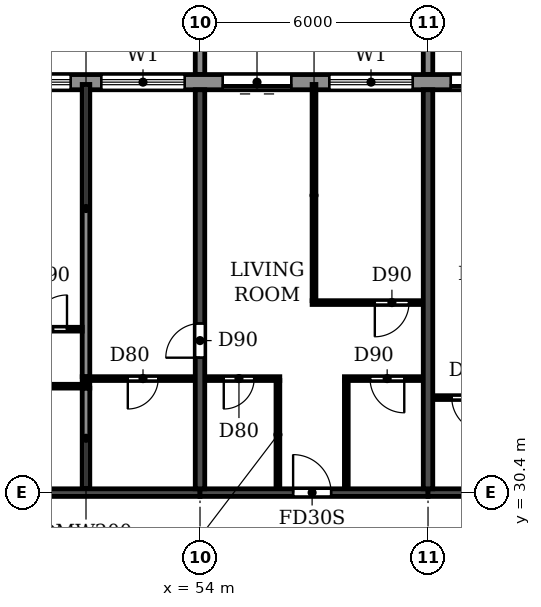
"""IFC4 building model, lengths in metres.
Left out: names, types, materials, properties, quantities, classifications, styles, units other than length and angle.
Written with IfcOpenShell. Run it as: python <this file> out.ifc"""

import sys

from ifc_helpers import new_model, si_unit, direction, frame, frame_2d, origin, place, context, subcontext, project, spatial, polyline, rectangle, outline, extrude, source, transform, mapped, element, fill, save


model = new_model("IFC4")
c1 = context("Model", 3, precision=1e-05, world=origin(), true_north=direction((0.0, 1.0)))
c2 = subcontext(c1, "Body", "Model", "MODEL_VIEW")
j1 = project(units=[si_unit("LENGTHUNIT", "METRE"), si_unit("PLANEANGLEUNIT", "RADIAN")], contexts=[c1])
p1 = place(None, origin())
s1 = spatial("IfcSite", under=j1, at=p1, CompositionType="ELEMENT")
p2 = place(p1, origin())
s2 = spatial("IfcBuilding", under=s1, at=p2, CompositionType="ELEMENT")
p3 = place(p2, frame((0.0, 0.0, 181.8)))
s3 = spatial("IfcBuildingStorey", under=s2, at=p3, CompositionType="ELEMENT", Elevation=181.8)
p4 = place(p3, frame((54.0, 30.5, 0.0), z_axis=(0.0, 0.0, 1.0), x_axis=(0.0, 1.0, 0.0)))
e1 = element("IfcWall", 1, at=p4, inside=s3, PredefinedType="SHEAR", context=c2, shape_type="SweptSolid", body=[
    extrude(rectangle(XDim=10.5, YDim=0.25, at=frame_2d((5.25, 0.0))), origin(), (0.0, 0.0, 1.0), 3.08),
])
p5 = place(p4, frame((3.45, 0.0, 0.0)))
e2 = element("IfcOpeningElement", 2, at=p5, cuts=e1, PredefinedType="OPENING", context=c2, shape_type="SweptSolid", body=[
    extrude(rectangle(XDim=0.9, YDim=2.1, at=frame_2d((0.45, 1.05))), frame((0.0, 0.135, 0.0), z_axis=(0.0, -1.0, 0.0), x_axis=(1.0, 0.0, 0.0)), (0.0, 0.0, 1.0), 0.27),
])
p6 = place(p3, frame((60.0, 30.5, 0.0), z_axis=(0.0, 0.0, 1.0), x_axis=(0.0, 1.0, 0.0)))
e3 = element("IfcWall", 3, at=p6, inside=s3, PredefinedType="SHEAR", context=c2, shape_type="SweptSolid", body=[
    extrude(rectangle(XDim=10.5, YDim=0.25, at=frame_2d((5.25, 0.0))), origin(), (0.0, 0.0, 1.0), 3.08),
])
p7 = place(p3, frame((48.0, 30.4, 0.0), z_axis=(0.0, 0.0, 1.0), x_axis=(1.0, 0.0, 0.0)))
e4 = element("IfcWall", 4, at=p7, inside=s3, PredefinedType="SHEAR", context=c2, shape_type="SweptSolid", body=[
    extrude(rectangle(XDim=6.0, YDim=0.2, at=frame_2d((3.0, 0.0))), origin(), (0.0, 0.0, 1.0), 2.48),
])
p8 = place(p3, frame((54.0, 30.4, 0.0), z_axis=(0.0, 0.0, 1.0), x_axis=(1.0, 0.0, 0.0)))
e5 = element("IfcWall", 5, at=p8, inside=s3, PredefinedType="SHEAR", context=c2, shape_type="SweptSolid", body=[
    extrude(rectangle(XDim=6.0, YDim=0.2, at=frame_2d((3.0, 0.0))), origin(), (0.0, 0.0, 1.0), 2.48),
])
p9 = place(p8, frame((2.45, 0.0, 0.0)))
e6 = element("IfcOpeningElement", 6, at=p9, cuts=e5, PredefinedType="OPENING", context=c2, shape_type="SweptSolid", body=[
    extrude(rectangle(XDim=1.0, YDim=2.1, at=frame_2d((0.5, 1.05))), frame((0.0, 0.11, 0.0), z_axis=(0.0, -1.0, 0.0), x_axis=(1.0, 0.0, 0.0)), (0.0, 0.0, 1.0), 0.22),
])
p10 = place(p3, frame((60.0, 30.4, 0.0), z_axis=(0.0, 0.0, 1.0), x_axis=(1.0, 0.0, 0.0)))
e7 = element("IfcWall", 7, at=p10, inside=s3, PredefinedType="SHEAR", context=c2, shape_type="SweptSolid", body=[
    extrude(rectangle(XDim=6.0, YDim=0.2, at=frame_2d((3.0, 0.0))), origin(), (0.0, 0.0, 1.0), 2.48),
])
p11 = place(p10, frame((2.55, 0.0, 0.0)))
e8 = element("IfcOpeningElement", 8, at=p11, cuts=e7, PredefinedType="OPENING", context=c2, shape_type="SweptSolid", body=[
    extrude(rectangle(XDim=1.0, YDim=2.1, at=frame_2d((0.5, 1.05))), frame((0.0, 0.11, 0.0), z_axis=(0.0, -1.0, 0.0), x_axis=(1.0, 0.0, 0.0)), (0.0, 0.0, 1.0), 0.22),
])
p12 = place(p3, frame((79.317, 41.2, 0.0), z_axis=(0.0, 0.0, 1.0), x_axis=(-1.0, 0.0, 0.0)))
e9 = element("IfcWall", 9, at=p12, inside=s3, PredefinedType="STANDARD", context=c2, shape_type="SweptSolid", body=[
    extrude(rectangle(XDim=56.634, YDim=0.4, at=frame_2d((28.317, 0.0))), origin(), (0.0, 0.0, 1.0), 3.08),
])
p13 = place(p12, frame((52.917, 0.0, 0.0)))
e10 = element("IfcOpeningElement", 10, at=p13, cuts=e9, PredefinedType="OPENING", context=c2, shape_type="SweptSolid", body=[
    extrude(rectangle(XDim=1.8, YDim=2.4, at=frame_2d((0.9, 1.2))), frame((0.0, 0.21, 0.0), z_axis=(0.0, -1.0, 0.0), x_axis=(1.0, 0.0, 0.0)), (0.0, 0.0, 1.0), 0.42),
])
p14 = place(p12, frame((49.717, 0.0, 0.9)))
e11 = element("IfcOpeningElement", 11, at=p14, cuts=e9, PredefinedType="OPENING", context=c2, shape_type="SweptSolid", body=[
    extrude(rectangle(XDim=2.2, YDim=1.5, at=frame_2d((1.1, 0.75))), frame((0.0, 0.21, 0.0), z_axis=(0.0, -1.0, 0.0), x_axis=(1.0, 0.0, 0.0)), (0.0, 0.0, 1.0), 0.42),
])
p15 = place(p12, frame((46.717, 0.0, 0.9)))
e12 = element("IfcOpeningElement", 12, at=p15, cuts=e9, PredefinedType="OPENING", context=c2, shape_type="SweptSolid", body=[
    extrude(rectangle(XDim=2.2, YDim=1.5, at=frame_2d((1.1, 0.75))), frame((0.0, 0.21, 0.0), z_axis=(0.0, -1.0, 0.0), x_axis=(1.0, 0.0, 0.0)), (0.0, 0.0, 1.0), 0.42),
])
p16 = place(p12, frame((43.917, 0.0, 0.0)))
e13 = element("IfcOpeningElement", 13, at=p16, cuts=e9, PredefinedType="OPENING", context=c2, shape_type="SweptSolid", body=[
    extrude(rectangle(XDim=1.8, YDim=2.4, at=frame_2d((0.9, 1.2))), frame((0.0, 0.21, 0.0), z_axis=(0.0, -1.0, 0.0), x_axis=(1.0, 0.0, 0.0)), (0.0, 0.0, 1.0), 0.42),
])
p17 = place(p12, frame((40.717, 0.0, 0.9)))
e14 = element("IfcOpeningElement", 14, at=p17, cuts=e9, PredefinedType="OPENING", context=c2, shape_type="SweptSolid", body=[
    extrude(rectangle(XDim=2.2, YDim=1.5, at=frame_2d((1.1, 0.75))), frame((0.0, 0.21, 0.0), z_axis=(0.0, -1.0, 0.0), x_axis=(1.0, 0.0, 0.0)), (0.0, 0.0, 1.0), 0.42),
])
p18 = place(p12, frame((37.717, 0.0, 0.9)))
e15 = element("IfcOpeningElement", 15, at=p18, cuts=e9, PredefinedType="OPENING", context=c2, shape_type="SweptSolid", body=[
    extrude(rectangle(XDim=2.2, YDim=1.5, at=frame_2d((1.1, 0.75))), frame((0.0, 0.21, 0.0), z_axis=(0.0, -1.0, 0.0), x_axis=(1.0, 0.0, 0.0)), (0.0, 0.0, 1.0), 0.42),
])
p19 = place(p12, frame((34.917, 0.0, 0.0)))
e16 = element("IfcOpeningElement", 16, at=p19, cuts=e9, PredefinedType="OPENING", context=c2, shape_type="SweptSolid", body=[
    extrude(rectangle(XDim=1.8, YDim=2.4, at=frame_2d((0.9, 1.2))), frame((0.0, 0.21, 0.0), z_axis=(0.0, -1.0, 0.0), x_axis=(1.0, 0.0, 0.0)), (0.0, 0.0, 1.0), 0.42),
])
p20 = place(p12, frame((31.717, 0.0, 0.9)))
e17 = element("IfcOpeningElement", 17, at=p20, cuts=e9, PredefinedType="OPENING", context=c2, shape_type="SweptSolid", body=[
    extrude(rectangle(XDim=2.2, YDim=1.5, at=frame_2d((1.1, 0.75))), frame((0.0, 0.21, 0.0), z_axis=(0.0, -1.0, 0.0), x_axis=(1.0, 0.0, 0.0)), (0.0, 0.0, 1.0), 0.42),
])
p21 = place(p12, frame((28.717, 0.0, 0.9)))
e18 = element("IfcOpeningElement", 18, at=p21, cuts=e9, PredefinedType="OPENING", context=c2, shape_type="SweptSolid", body=[
    extrude(rectangle(XDim=2.2, YDim=1.5, at=frame_2d((1.1, 0.75))), frame((0.0, 0.21, 0.0), z_axis=(0.0, -1.0, 0.0), x_axis=(1.0, 0.0, 0.0)), (0.0, 0.0, 1.0), 0.42),
])
p22 = place(p12, frame((25.717, 0.0, 0.9)))
e19 = element("IfcOpeningElement", 19, at=p22, cuts=e9, PredefinedType="OPENING", context=c2, shape_type="SweptSolid", body=[
    extrude(rectangle(XDim=2.2, YDim=1.5, at=frame_2d((1.1, 0.75))), frame((0.0, 0.21, 0.0), z_axis=(0.0, -1.0, 0.0), x_axis=(1.0, 0.0, 0.0)), (0.0, 0.0, 1.0), 0.42),
])
p23 = place(p12, frame((22.917, 0.0, 0.0)))
e20 = element("IfcOpeningElement", 20, at=p23, cuts=e9, PredefinedType="OPENING", context=c2, shape_type="SweptSolid", body=[
    extrude(rectangle(XDim=1.8, YDim=2.4, at=frame_2d((0.9, 1.2))), frame((0.0, 0.21, 0.0), z_axis=(0.0, -1.0, 0.0), x_axis=(1.0, 0.0, 0.0)), (0.0, 0.0, 1.0), 0.42),
])
p24 = place(p12, frame((19.717, 0.0, 0.9)))
e21 = element("IfcOpeningElement", 21, at=p24, cuts=e9, PredefinedType="OPENING", context=c2, shape_type="SweptSolid", body=[
    extrude(rectangle(XDim=2.2, YDim=1.5, at=frame_2d((1.1, 0.75))), frame((0.0, 0.21, 0.0), z_axis=(0.0, -1.0, 0.0), x_axis=(1.0, 0.0, 0.0)), (0.0, 0.0, 1.0), 0.42),
])
p25 = place(p12, frame((16.917, 0.0, 0.0)))
e22 = element("IfcOpeningElement", 22, at=p25, cuts=e9, PredefinedType="OPENING", context=c2, shape_type="SweptSolid", body=[
    extrude(rectangle(XDim=1.8, YDim=2.4, at=frame_2d((0.9, 1.2))), frame((0.0, 0.21, 0.0), z_axis=(0.0, -1.0, 0.0), x_axis=(1.0, 0.0, 0.0)), (0.0, 0.0, 1.0), 0.42),
])
p26 = place(p12, frame((13.717, 0.0, 0.9)))
e23 = element("IfcOpeningElement", 23, at=p26, cuts=e9, PredefinedType="OPENING", context=c2, shape_type="SweptSolid", body=[
    extrude(rectangle(XDim=2.2, YDim=1.5, at=frame_2d((1.1, 0.75))), frame((0.0, 0.21, 0.0), z_axis=(0.0, -1.0, 0.0), x_axis=(1.0, 0.0, 0.0)), (0.0, 0.0, 1.0), 0.42),
])
p27 = place(p12, frame((10.917, 0.0, 0.0)))
e24 = element("IfcOpeningElement", 24, at=p27, cuts=e9, PredefinedType="OPENING", context=c2, shape_type="SweptSolid", body=[
    extrude(rectangle(XDim=1.8, YDim=2.4, at=frame_2d((0.9, 1.2))), frame((0.0, 0.21, 0.0), z_axis=(0.0, -1.0, 0.0), x_axis=(1.0, 0.0, 0.0)), (0.0, 0.0, 1.0), 0.42),
])
p28 = place(p12, frame((7.717, 0.0, 0.9)))
e25 = element("IfcOpeningElement", 25, at=p28, cuts=e9, PredefinedType="OPENING", context=c2, shape_type="SweptSolid", body=[
    extrude(rectangle(XDim=2.2, YDim=1.5, at=frame_2d((1.1, 0.75))), frame((0.0, 0.21, 0.0), z_axis=(0.0, -1.0, 0.0), x_axis=(1.0, 0.0, 0.0)), (0.0, 0.0, 1.0), 0.42),
])
p29 = place(p12, frame((4.717, 0.0, 0.9)))
e26 = element("IfcOpeningElement", 26, at=p29, cuts=e9, PredefinedType="OPENING", context=c2, shape_type="SweptSolid", body=[
    extrude(rectangle(XDim=2.2, YDim=1.5, at=frame_2d((1.1, 0.75))), frame((0.0, 0.21, 0.0), z_axis=(0.0, -1.0, 0.0), x_axis=(1.0, 0.0, 0.0)), (0.0, 0.0, 1.0), 0.42),
])
p30 = place(p12, frame((1.917, 0.0, 0.0)))
e27 = element("IfcOpeningElement", 27, at=p30, cuts=e9, PredefinedType="OPENING", context=c2, shape_type="SweptSolid", body=[
    extrude(rectangle(XDim=1.8, YDim=2.4, at=frame_2d((0.9, 1.2))), frame((0.0, 0.21, 0.0), z_axis=(0.0, -1.0, 0.0), x_axis=(1.0, 0.0, 0.0)), (0.0, 0.0, 1.0), 0.42),
])
m1 = source(origin(), c2, "Body", "SweptSolid", [
    extrude(outline(polyline([(0.0, 0.0), (0.25, 0.0), (0.25, 3.1), (0.0, 3.1), (0.0, 0.0)])), origin(), (0.0, 0.0, 1.0), 3.1),
])
for number, where in (
    (28, (53.875, 41.4, 0.0)),
    (29, (59.875, 41.4, 0.0)),
):
    element("IfcWall", number, at=place(p3, frame(where)), inside=s3, PredefinedType="STANDARD", context=c2, shape_type="MappedRepresentation", body=[
        mapped(m1, transform((0.0, 0.0, 0.0))),
    ])
p31 = place(p3, frame((51.0, 30.51, 0.0), z_axis=(0.0, 0.0, 1.0), x_axis=(0.0, 1.0, 0.0)))
e30 = element("IfcWall", 30, at=p31, inside=s3, PredefinedType="PARTITIONING", context=c2, shape_type="SweptSolid", body=[
    extrude(rectangle(XDim=2.64, YDim=0.2, at=frame_2d((1.32, 0.0))), origin(), (0.0, 0.0, 1.0), 3.08),
])
p32 = place(p3, frame((51.0, 33.45, 0.0), z_axis=(0.0, 0.0, 1.0), x_axis=(0.0, 1.0, 0.0)))
e31 = element("IfcWall", 31, at=p32, inside=s3, PredefinedType="PARTITIONING", context=c2, shape_type="SweptSolid", body=[
    extrude(rectangle(XDim=7.69, YDim=0.2, at=frame_2d((3.845, 0.0))), origin(), (0.0, 0.0, 1.0), 3.08),
])
p33 = place(p3, frame((60.135, 32.9, 0.0), z_axis=(0.0, 0.0, 1.0), x_axis=(1.0, 0.0, 0.0)))
e32 = element("IfcWall", 32, at=p33, inside=s3, PredefinedType="PARTITIONING", context=c2, shape_type="SweptSolid", body=[
    extrude(rectangle(XDim=2.065, YDim=0.1, at=frame_2d((1.032, 0.0))), origin(), (0.0, 0.0, 1.0), 3.08),
])
p34 = place(p33, frame((0.49, 0.0, 0.0)))
e33 = element("IfcOpeningElement", 33, at=p34, cuts=e32, PredefinedType="OPENING", context=c2, shape_type="SweptSolid", body=[
    extrude(rectangle(XDim=0.9, YDim=2.1, at=frame_2d((0.45, 1.05))), frame((0.0, 0.06, 0.0), z_axis=(0.0, -1.0, 0.0), x_axis=(1.0, 0.0, 0.0)), (0.0, 0.0, 1.0), 0.12),
])
p35 = place(p3, frame((48.135, 33.2, 0.0), z_axis=(0.0, 0.0, 1.0), x_axis=(1.0, 0.0, 0.0)))
e34 = element("IfcWall", 34, at=p35, inside=s3, PredefinedType="PARTITIONING", context=c2, shape_type="SweptSolid", body=[
    extrude(rectangle(XDim=2.965, YDim=0.1, at=frame_2d((1.482, 0.0))), origin(), (0.0, 0.0, 1.0), 3.08),
])
p36 = place(p35, frame((0.965, 0.0, 0.0)))
e35 = element("IfcOpeningElement", 35, at=p36, cuts=e34, PredefinedType="OPENING", context=c2, shape_type="SweptSolid", body=[
    extrude(rectangle(XDim=0.8, YDim=2.1, at=frame_2d((0.4, 1.05))), frame((0.0, 0.06, 0.0), z_axis=(0.0, -1.0, 0.0), x_axis=(1.0, 0.0, 0.0)), (0.0, 0.0, 1.0), 0.12),
])
p37 = place(p3, frame((50.9, 33.4, 0.0), z_axis=(0.0, 0.0, 1.0), x_axis=(1.0, 0.0, 0.0)))
e36 = element("IfcWall", 36, at=p37, inside=s3, PredefinedType="PARTITIONING", context=c2, shape_type="SweptSolid", body=[
    extrude(rectangle(XDim=2.965, YDim=0.1, at=frame_2d((1.482, 0.0))), origin(), (0.0, 0.0, 1.0), 3.08),
])
p38 = place(p37, frame((1.2, 0.0, 0.0)))
e37 = element("IfcOpeningElement", 37, at=p38, cuts=e36, PredefinedType="OPENING", context=c2, shape_type="SweptSolid", body=[
    extrude(rectangle(XDim=0.8, YDim=2.1, at=frame_2d((0.4, 1.05))), frame((0.0, 0.06, 0.0), z_axis=(0.0, -1.0, 0.0), x_axis=(1.0, 0.0, 0.0)), (0.0, 0.0, 1.0), 0.12),
])
p39 = place(p3, frame((54.135, 33.4, 0.0), z_axis=(0.0, 0.0, 1.0), x_axis=(1.0, 0.0, 0.0)))
e38 = element("IfcWall", 38, at=p39, inside=s3, PredefinedType="PARTITIONING", context=c2, shape_type="SweptSolid", body=[
    extrude(rectangle(XDim=1.965, YDim=0.1, at=frame_2d((0.982, 0.0))), origin(), (0.0, 0.0, 1.0), 3.08),
])
p40 = place(p39, frame((0.49, 0.0, 0.0)))
e39 = element("IfcOpeningElement", 39, at=p40, cuts=e38, PredefinedType="OPENING", context=c2, shape_type="SweptSolid", body=[
    extrude(rectangle(XDim=0.8, YDim=2.1, at=frame_2d((0.4, 1.05))), frame((0.0, 0.06, 0.0), z_axis=(0.0, -1.0, 0.0), x_axis=(1.0, 0.0, 0.0)), (0.0, 0.0, 1.0), 0.12),
])
p41 = place(p3, frame((57.8, 33.4, 0.0), z_axis=(0.0, 0.0, 1.0), x_axis=(1.0, 0.0, 0.0)))
e40 = element("IfcWall", 40, at=p41, inside=s3, PredefinedType="PARTITIONING", context=c2, shape_type="SweptSolid", body=[
    extrude(rectangle(XDim=2.065, YDim=0.1, at=frame_2d((1.032, 0.0))), origin(), (0.0, 0.0, 1.0), 3.08),
])
p42 = place(p41, frame((0.675, 0.0, 0.0)))
e41 = element("IfcOpeningElement", 41, at=p42, cuts=e40, PredefinedType="OPENING", context=c2, shape_type="SweptSolid", body=[
    extrude(rectangle(XDim=0.9, YDim=2.1, at=frame_2d((0.45, 1.05))), frame((0.0, 0.06, 0.0), z_axis=(0.0, -1.0, 0.0), x_axis=(1.0, 0.0, 0.0)), (0.0, 0.0, 1.0), 0.12),
])
p43 = place(p3, frame((48.135, 34.7, 0.0), z_axis=(0.0, 0.0, 1.0), x_axis=(1.0, 0.0, 0.0)))
e42 = element("IfcWall", 42, at=p43, inside=s3, PredefinedType="PARTITIONING", context=c2, shape_type="SweptSolid", body=[
    extrude(rectangle(XDim=2.765, YDim=0.1, at=frame_2d((1.382, 0.0))), origin(), (0.0, 0.0, 1.0), 3.08),
])
p44 = place(p43, frame((1.465, 0.0, 0.0)))
e43 = element("IfcOpeningElement", 43, at=p44, cuts=e42, PredefinedType="OPENING", context=c2, shape_type="SweptSolid", body=[
    extrude(rectangle(XDim=0.9, YDim=2.1, at=frame_2d((0.45, 1.05))), frame((0.0, 0.06, 0.0), z_axis=(0.0, -1.0, 0.0), x_axis=(1.0, 0.0, 0.0)), (0.0, 0.0, 1.0), 0.12),
])
p45 = place(p3, frame((56.95, 35.4, 0.0), z_axis=(0.0, 0.0, 1.0), x_axis=(1.0, 0.0, 0.0)))
e44 = element("IfcWall", 44, at=p45, inside=s3, PredefinedType="PARTITIONING", context=c2, shape_type="SweptSolid", body=[
    extrude(rectangle(XDim=2.915, YDim=0.1, at=frame_2d((1.458, 0.0))), origin(), (0.0, 0.0, 1.0), 3.08),
])
p46 = place(p45, frame((1.65, 0.0, 0.0)))
e45 = element("IfcOpeningElement", 45, at=p46, cuts=e44, PredefinedType="OPENING", context=c2, shape_type="SweptSolid", body=[
    extrude(rectangle(XDim=0.9, YDim=2.1, at=frame_2d((0.45, 1.05))), frame((0.0, 0.06, 0.0), z_axis=(0.0, -1.0, 0.0), x_axis=(1.0, 0.0, 0.0)), (0.0, 0.0, 1.0), 0.12),
])
p47 = place(p3, frame((56.05, 30.51, 0.0), z_axis=(0.0, 0.0, 1.0), x_axis=(0.0, 1.0, 0.0)))
e46 = element("IfcWall", 46, at=p47, inside=s3, PredefinedType="PARTITIONING", context=c2, shape_type="SweptSolid", body=[
    extrude(rectangle(XDim=2.84, YDim=0.1, at=frame_2d((1.42, 0.0))), origin(), (0.0, 0.0, 1.0), 3.08),
])
p48 = place(p3, frame((57.0, 35.45, 0.0), z_axis=(0.0, 0.0, 1.0), x_axis=(0.0, 1.0, 0.0)))
e47 = element("IfcWall", 47, at=p48, inside=s3, PredefinedType="PARTITIONING", context=c2, shape_type="SweptSolid", body=[
    extrude(rectangle(XDim=5.69, YDim=0.1, at=frame_2d((2.845, 0.0))), origin(), (0.0, 0.0, 1.0), 3.08),
])
p49 = place(p3, frame((57.85, 30.51, 0.0), z_axis=(0.0, 0.0, 1.0), x_axis=(0.0, 1.0, 0.0)))
e48 = element("IfcWall", 48, at=p49, inside=s3, PredefinedType="PARTITIONING", context=c2, shape_type="SweptSolid", body=[
    extrude(rectangle(XDim=2.84, YDim=0.1, at=frame_2d((1.42, 0.0))), origin(), (0.0, 0.0, 1.0), 3.08),
])
p50 = place(p21, origin())
e49 = element("IfcWindow", 49, at=p50, inside=s3, PartitioningType="DOUBLE_PANEL_HORIZONTAL", PredefinedType="WINDOW", context=c2, shape_type="SweptSolid", body=[
    extrude(rectangle(XDim=2.2, YDim=1.5, at=frame_2d((1.1, 0.75))), frame((0.0, 0.03, 0.0), z_axis=(0.0, -1.0, 0.0), x_axis=(1.0, 0.0, 0.0)), (0.0, 0.0, 1.0), 0.06),
])
fill(e18, e49)
p51 = place(p22, origin())
e50 = element("IfcWindow", 50, at=p51, inside=s3, PartitioningType="DOUBLE_PANEL_HORIZONTAL", PredefinedType="WINDOW", context=c2, shape_type="SweptSolid", body=[
    extrude(rectangle(XDim=2.2, YDim=1.5, at=frame_2d((1.1, 0.75))), frame((0.0, 0.03, 0.0), z_axis=(0.0, -1.0, 0.0), x_axis=(1.0, 0.0, 0.0)), (0.0, 0.0, 1.0), 0.06),
])
fill(e19, e50)
p52 = place(p23, origin())
e51 = element("IfcDoor", 51, at=p52, inside=s3, OperationType="DOUBLE_DOOR_SLIDING", PredefinedType="DOOR", context=c2, shape_type="SweptSolid", body=[
    extrude(rectangle(XDim=1.8, YDim=2.4, at=frame_2d((0.9, 1.2))), frame((0.0, 0.025, 0.0), z_axis=(0.0, -1.0, 0.0), x_axis=(1.0, 0.0, 0.0)), (0.0, 0.0, 1.0), 0.05),
])
fill(e20, e51)
p53 = place(p24, origin())
e52 = element("IfcWindow", 52, at=p53, inside=s3, PartitioningType="DOUBLE_PANEL_HORIZONTAL", PredefinedType="WINDOW", context=c2, shape_type="SweptSolid", body=[
    extrude(rectangle(XDim=2.2, YDim=1.5, at=frame_2d((1.1, 0.75))), frame((0.0, 0.03, 0.0), z_axis=(0.0, -1.0, 0.0), x_axis=(1.0, 0.0, 0.0)), (0.0, 0.0, 1.0), 0.06),
])
fill(e21, e52)
p54 = place(p25, origin())
e53 = element("IfcDoor", 53, at=p54, inside=s3, OperationType="DOUBLE_DOOR_SLIDING", PredefinedType="DOOR", context=c2, shape_type="SweptSolid", body=[
    extrude(rectangle(XDim=1.8, YDim=2.4, at=frame_2d((0.9, 1.2))), frame((0.0, 0.025, 0.0), z_axis=(0.0, -1.0, 0.0), x_axis=(1.0, 0.0, 0.0)), (0.0, 0.0, 1.0), 0.05),
])
fill(e22, e53)
p55 = place(p44, origin())
e54 = element("IfcDoor", 54, at=p55, inside=s3, OperationType="SINGLE_SWING_RIGHT", PredefinedType="DOOR", context=c2, shape_type="SweptSolid", body=[
    extrude(rectangle(XDim=0.9, YDim=2.1, at=frame_2d((0.45, 1.05))), frame((0.0, 0.025, 0.0), z_axis=(0.0, -1.0, 0.0), x_axis=(1.0, 0.0, 0.0)), (0.0, 0.0, 1.0), 0.05),
])
fill(e43, e54)
p56 = place(p38, frame((0.8, 0.0, 0.0), z_axis=(0.0, 0.0, 1.0), x_axis=(-1.0, 0.0, 0.0)))
e55 = element("IfcDoor", 55, at=p56, inside=s3, OperationType="SINGLE_SWING_RIGHT", PredefinedType="DOOR", context=c2, shape_type="SweptSolid", body=[
    extrude(rectangle(XDim=0.8, YDim=2.1, at=frame_2d((0.4, 1.05))), frame((0.0, 0.025, 0.0), z_axis=(0.0, -1.0, 0.0), x_axis=(1.0, 0.0, 0.0)), (0.0, 0.0, 1.0), 0.05),
])
fill(e37, e55)
p57 = place(p5, origin())
e56 = element("IfcDoor", 56, at=p57, inside=s3, OperationType="SINGLE_SWING_LEFT", PredefinedType="DOOR", context=c2, shape_type="SweptSolid", body=[
    extrude(rectangle(XDim=0.9, YDim=2.1, at=frame_2d((0.45, 1.05))), frame((0.0, 0.025, 0.0), z_axis=(0.0, -1.0, 0.0), x_axis=(1.0, 0.0, 0.0)), (0.0, 0.0, 1.0), 0.05),
])
fill(e2, e56)
p58 = place(p40, frame((0.8, 0.0, 0.0), z_axis=(0.0, 0.0, 1.0), x_axis=(-1.0, 0.0, 0.0)))
e57 = element("IfcDoor", 57, at=p58, inside=s3, OperationType="SINGLE_SWING_RIGHT", PredefinedType="DOOR", context=c2, shape_type="SweptSolid", body=[
    extrude(rectangle(XDim=0.8, YDim=2.1, at=frame_2d((0.4, 1.05))), frame((0.0, 0.025, 0.0), z_axis=(0.0, -1.0, 0.0), x_axis=(1.0, 0.0, 0.0)), (0.0, 0.0, 1.0), 0.05),
])
fill(e39, e57)
p59 = place(p9, origin())
e58 = element("IfcDoor", 58, at=p59, inside=s3, OperationType="SINGLE_SWING_LEFT", PredefinedType="DOOR", context=c2, shape_type="SweptSolid", body=[
    extrude(rectangle(XDim=1.0, YDim=2.1, at=frame_2d((0.5, 1.05))), frame((0.0, 0.025, 0.0), z_axis=(0.0, -1.0, 0.0), x_axis=(1.0, 0.0, 0.0)), (0.0, 0.0, 1.0), 0.05),
])
fill(e6, e58)
p60 = place(p42, frame((0.9, 0.0, 0.0), z_axis=(0.0, 0.0, 1.0), x_axis=(-1.0, 0.0, 0.0)))
e59 = element("IfcDoor", 59, at=p60, inside=s3, OperationType="SINGLE_SWING_LEFT", PredefinedType="DOOR", context=c2, shape_type="SweptSolid", body=[
    extrude(rectangle(XDim=0.9, YDim=2.1, at=frame_2d((0.45, 1.05))), frame((0.0, 0.025, 0.0), z_axis=(0.0, -1.0, 0.0), x_axis=(1.0, 0.0, 0.0)), (0.0, 0.0, 1.0), 0.05),
])
fill(e41, e59)
p61 = place(p46, frame((0.9, 0.0, 0.0), z_axis=(0.0, 0.0, 1.0), x_axis=(-1.0, 0.0, 0.0)))
e60 = element("IfcDoor", 60, at=p61, inside=s3, OperationType="SINGLE_SWING_RIGHT", PredefinedType="DOOR", context=c2, shape_type="SweptSolid", body=[
    extrude(rectangle(XDim=0.9, YDim=2.1, at=frame_2d((0.45, 1.05))), frame((0.0, 0.025, 0.0), z_axis=(0.0, -1.0, 0.0), x_axis=(1.0, 0.0, 0.0)), (0.0, 0.0, 1.0), 0.05),
])
fill(e45, e60)
p62 = place(p34, frame((0.9, 0.0, 0.0), z_axis=(0.0, 0.0, 1.0), x_axis=(-1.0, 0.0, 0.0)))
e61 = element("IfcDoor", 61, at=p62, inside=s3, OperationType="SINGLE_SWING_LEFT", PredefinedType="DOOR", context=c2, shape_type="SweptSolid", body=[
    extrude(rectangle(XDim=0.9, YDim=2.1, at=frame_2d((0.45, 1.05))), frame((0.0, 0.025, 0.0), z_axis=(0.0, -1.0, 0.0), x_axis=(1.0, 0.0, 0.0)), (0.0, 0.0, 1.0), 0.05),
])
fill(e33, e61)
save(model, sys.argv[1])
